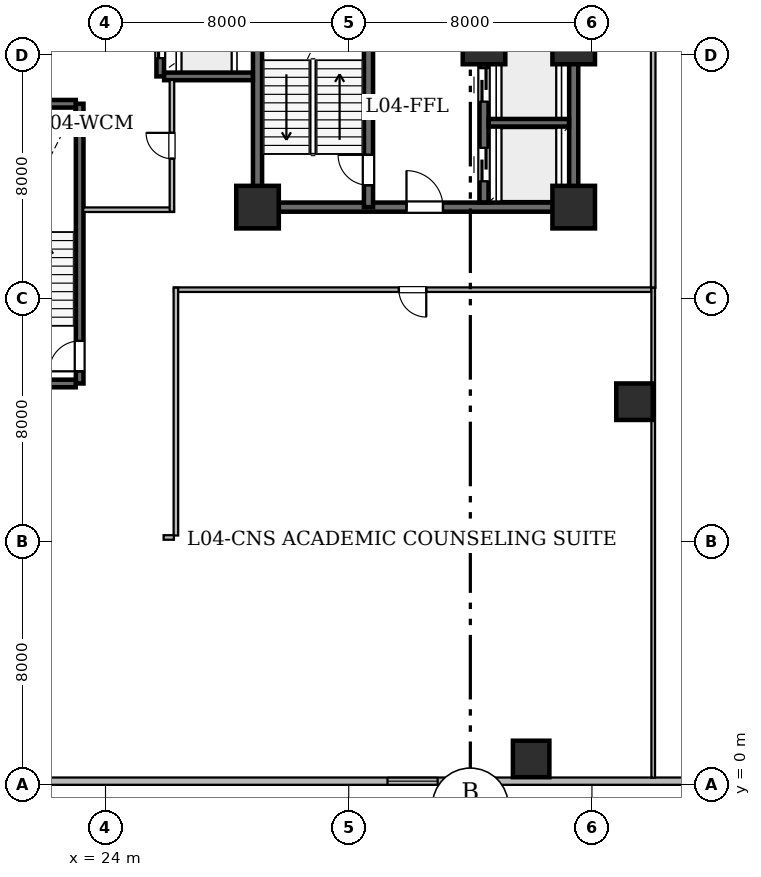
"""IFC4 building model, lengths in metres.
Left out: names, types, materials, properties, quantities, classifications, styles, units other than length and angle.
Written with IfcOpenShell. Run it as: python <this file> out.ifc"""

import sys

from ifc_helpers import new_model, si_unit, direction, frame, frame_2d, origin, origin_2d, place, context, subcontext, project, spatial, rectangle, hollow_rectangle, extrude, element, fill, save


model = new_model("IFC4")
c1 = context("Model", 3, precision=1e-05, world=origin(), true_north=direction((0.0, 1.0)))
c2 = subcontext(c1, "Body", "Model", "MODEL_VIEW")
j1 = project(units=[si_unit("LENGTHUNIT", "METRE"), si_unit("PLANEANGLEUNIT", "RADIAN")], contexts=[c1])
p1 = place(None, origin())
s1 = spatial("IfcSite", under=j1, at=p1, CompositionType="ELEMENT")
p2 = place(p1, origin())
s2 = spatial("IfcBuilding", under=s1, at=p2, CompositionType="ELEMENT")
p3 = place(p2, frame((0.0, 0.0, 20.4)))
s3 = spatial("IfcBuildingStorey", under=s2, at=p3, CompositionType="ELEMENT", Elevation=20.4)
for number, where, z_axis, x_axis in (
    (1, (29.0, 19.0, 0.0), (0.0, 0.0, 1.0), (1.0, 0.0, 0.0)),
    (2, (39.4, 19.0, 0.0), (0.0, 0.0, 1.0), (1.0, 0.0, 0.0)),
    (3, (36.45, 24.4, 0.0), (0.0, 0.0, 1.0), (1.0, 0.0, 0.0)),
    (4, (39.4, 24.4, 0.0), (0.0, 0.0, 1.0), (1.0, 0.0, 0.0)),
):
    element("IfcColumn", number, at=place(p3, frame(where, z_axis=z_axis, x_axis=x_axis)), inside=s3, PredefinedType="COLUMN", context=c2, shape_type="SweptSolid", body=[
        extrude(hollow_rectangle(XDim=1.4, YDim=1.4, WallThickness=0.07, at=origin_2d()), origin(), (0.0, 0.0, 1.0), 4.2),
    ])
for number, where, z_axis, x_axis in (
    (5, (38.0, 0.85, 0.0), (0.0, 0.0, 1.0), (1.0, 0.0, 0.0)),
    (6, (41.4, 12.6, 0.0), (0.0, 0.0, 1.0), (1.0, 0.0, 0.0)),
):
    element("IfcColumn", number, at=place(p3, frame(where, z_axis=z_axis, x_axis=x_axis)), inside=s3, PredefinedType="COLUMN", context=c2, shape_type="SweptSolid", body=[
        extrude(hollow_rectangle(XDim=1.2, YDim=1.2, WallThickness=0.06, at=origin_2d()), origin(), (0.0, 0.0, 1.0), 4.2),
    ])
p4 = place(p3, frame((50.275, 0.12, 0.0), z_axis=(0.0, 0.0, 1.0), x_axis=(-1.0, 0.0, 0.0)))
e7 = element("IfcWall", 7, at=p4, inside=s3, PredefinedType="STANDARD", context=c2, shape_type="SweptSolid", body=[
    extrude(rectangle(XDim=44.55, YDim=0.24, at=frame_2d((22.275, 0.0))), origin(), (0.0, 0.0, 1.0), 3.92),
])
p5 = place(p4, frame((15.35, 0.0, 0.85)))
e8 = element("IfcOpeningElement", 8, at=p5, cuts=e7, PredefinedType="OPENING", context=c2, shape_type="SweptSolid", body=[
    extrude(rectangle(XDim=1.65, YDim=1.55, at=frame_2d((0.825, 0.775))), frame((0.0, 0.13, 0.0), z_axis=(0.0, -1.0, 0.0), x_axis=(1.0, 0.0, 0.0)), (0.0, 0.0, 1.0), 0.26),
])
p6 = place(p3, frame((29.0, 19.0, 0.0), z_axis=(0.0, 0.0, 1.0), x_axis=(0.0, 1.0, 0.0)))
e9 = element("IfcWall", 9, at=p6, inside=s3, PredefinedType="SHEAR", context=c2, shape_type="SweptSolid", body=[
    extrude(rectangle(XDim=9.0, YDim=0.3, at=frame_2d((4.5, 0.0))), origin(), (0.0, 0.0, 1.0), 3.92),
])
p7 = place(p3, frame((29.0, 19.0, 0.0), z_axis=(0.0, 0.0, 1.0), x_axis=(1.0, 0.0, 0.0)))
e10 = element("IfcWall", 10, at=p7, inside=s3, PredefinedType="SHEAR", context=c2, shape_type="SweptSolid", body=[
    extrude(rectangle(XDim=10.4, YDim=0.3, at=frame_2d((5.2, 0.0))), origin(), (0.0, 0.0, 1.0), 3.92),
])
p8 = place(p7, frame((4.9, 0.0, 0.0)))
e11 = element("IfcOpeningElement", 11, at=p8, cuts=e10, PredefinedType="OPENING", context=c2, shape_type="SweptSolid", body=[
    extrude(rectangle(XDim=1.2, YDim=2.15, at=frame_2d((0.6, 1.075))), frame((0.0, 0.16, 0.0), z_axis=(0.0, -1.0, 0.0), x_axis=(1.0, 0.0, 0.0)), (0.0, 0.0, 1.0), 0.32),
])
p9 = place(p3, frame((39.4, 19.0, 0.0), z_axis=(0.0, 0.0, 1.0), x_axis=(0.0, 1.0, 0.0)))
e12 = element("IfcWall", 12, at=p9, inside=s3, PredefinedType="SHEAR", context=c2, shape_type="SweptSolid", body=[
    extrude(rectangle(XDim=5.4, YDim=0.3, at=frame_2d((2.7, 0.0))), origin(), (0.0, 0.0, 1.0), 3.92),
])
p10 = place(p3, frame((32.65, 19.0, 0.0), z_axis=(0.0, 0.0, 1.0), x_axis=(0.0, 1.0, 0.0)))
e13 = element("IfcWall", 13, at=p10, inside=s3, PredefinedType="SHEAR", context=c2, shape_type="SweptSolid", body=[
    extrude(rectangle(XDim=9.0, YDim=0.3, at=frame_2d((4.5, 0.0))), origin(), (0.0, 0.0, 1.0), 3.92),
])
p11 = place(p10, frame((0.72, 0.0, 0.0)))
e14 = element("IfcOpeningElement", 14, at=p11, cuts=e13, PredefinedType="OPENING", context=c2, shape_type="SweptSolid", body=[
    extrude(rectangle(XDim=1.0, YDim=2.15, at=frame_2d((0.5, 1.075))), frame((0.0, 0.16, 0.0), z_axis=(0.0, -1.0, 0.0), x_axis=(1.0, 0.0, 0.0)), (0.0, 0.0, 1.0), 0.32),
])
p12 = place(p3, frame((36.45, 19.154, 0.0), z_axis=(0.0, 0.0, 1.0), x_axis=(0.0, 1.0, 0.0)))
e15 = element("IfcWall", 15, at=p12, inside=s3, PredefinedType="SHEAR", context=c2, shape_type="SweptSolid", body=[
    extrude(rectangle(XDim=4.546, YDim=0.3, at=frame_2d((2.273, 0.0))), origin(), (0.0, 0.0, 1.0), 3.92),
])
p13 = place(p12, frame((0.696, 0.0, 0.0)))
e16 = element("IfcOpeningElement", 16, at=p13, cuts=e15, PredefinedType="OPENING", context=c2, shape_type="SweptSolid", body=[
    extrude(rectangle(XDim=1.1, YDim=2.15, at=frame_2d((0.55, 1.075))), frame((0.0, 0.16, 0.0), z_axis=(0.0, -1.0, 0.0), x_axis=(1.0, 0.0, 0.0)), (0.0, 0.0, 1.0), 0.32),
])
p14 = place(p12, frame((3.316, 0.0, 0.0)))
e17 = element("IfcOpeningElement", 17, at=p14, cuts=e15, PredefinedType="OPENING", context=c2, shape_type="SweptSolid", body=[
    extrude(rectangle(XDim=1.1, YDim=2.15, at=frame_2d((0.55, 1.075))), frame((0.0, 0.16, 0.0), z_axis=(0.0, -1.0, 0.0), x_axis=(1.0, 0.0, 0.0)), (0.0, 0.0, 1.0), 0.32),
])
p15 = place(p3, frame((36.604, 21.775, 0.0), z_axis=(0.0, 0.0, 1.0), x_axis=(1.0, 0.0, 0.0)))
e18 = element("IfcWall", 18, at=p15, inside=s3, PredefinedType="SHEAR", context=c2, shape_type="SweptSolid", body=[
    extrude(rectangle(XDim=2.642, YDim=0.25, at=frame_2d((1.321, 0.0))), origin(), (0.0, 0.0, 1.0), 3.92),
])
p16 = place(p3, frame((23.15, 13.2, 0.0), z_axis=(0.0, 0.0, 1.0), x_axis=(0.0, 1.0, 0.0)))
e19 = element("IfcWall", 19, at=p16, inside=s3, PredefinedType="SHEAR", context=c2, shape_type="SweptSolid", body=[
    extrude(rectangle(XDim=9.2, YDim=0.25, at=frame_2d((4.6, 0.0))), origin(), (0.0, 0.0, 1.0), 3.92),
])
p17 = place(p16, frame((0.4, 0.0, 0.0)))
e20 = element("IfcOpeningElement", 20, at=p17, cuts=e19, PredefinedType="OPENING", context=c2, shape_type="SweptSolid", body=[
    extrude(rectangle(XDim=1.0, YDim=2.15, at=frame_2d((0.5, 1.075))), frame((0.0, 0.135, 0.0), z_axis=(0.0, -1.0, 0.0), x_axis=(1.0, 0.0, 0.0)), (0.0, 0.0, 1.0), 0.27),
])
for number, where, z_axis, x_axis in (
    (21, (19.329, 13.2, 0.0), (0.0, 0.0, 1.0), (1.0, 0.0, 0.0)),
    (22, (19.329, 22.4, 0.0), (0.0, 0.0, 1.0), (1.0, 0.0, 0.0)),
):
    element("IfcWall", number, at=place(p3, frame(where, z_axis=z_axis, x_axis=x_axis)), inside=s3, PredefinedType="SHEAR", context=c2, shape_type="SweptSolid", body=[
        extrude(rectangle(XDim=3.692, YDim=0.25, at=frame_2d((1.846, 0.0))), origin(), (0.0, 0.0, 1.0), 3.92),
    ])
p18 = place(p3, frame((25.8, 23.3, 0.0), z_axis=(0.0, 0.0, 1.0), x_axis=(0.0, 1.0, 0.0)))
e23 = element("IfcWall", 23, at=p18, inside=s3, PredefinedType="SHEAR", context=c2, shape_type="SweptSolid", body=[
    extrude(rectangle(XDim=4.55, YDim=0.25, at=frame_2d((2.275, 0.0))), origin(), (0.0, 0.0, 1.0), 3.92),
])
p19 = place(p18, frame((0.6, 0.0, 0.0)))
e24 = element("IfcOpeningElement", 24, at=p19, cuts=e23, PredefinedType="OPENING", context=c2, shape_type="SweptSolid", body=[
    extrude(rectangle(XDim=1.1, YDim=2.15, at=frame_2d((0.55, 1.075))), frame((0.0, 0.135, 0.0), z_axis=(0.0, -1.0, 0.0), x_axis=(1.0, 0.0, 0.0)), (0.0, 0.0, 1.0), 0.27),
])
p20 = place(p18, frame((2.85, 0.0, 0.0)))
e25 = element("IfcOpeningElement", 25, at=p20, cuts=e23, PredefinedType="OPENING", context=c2, shape_type="SweptSolid", body=[
    extrude(rectangle(XDim=1.1, YDim=2.15, at=frame_2d((0.55, 1.075))), frame((0.0, 0.135, 0.0), z_axis=(0.0, -1.0, 0.0), x_axis=(1.0, 0.0, 0.0)), (0.0, 0.0, 1.0), 0.27),
])
p21 = place(p3, frame((25.929, 23.3, 0.0), z_axis=(0.0, 0.0, 1.0), x_axis=(1.0, 0.0, 0.0)))
e26 = element("IfcWall", 26, at=p21, inside=s3, PredefinedType="SHEAR", context=c2, shape_type="SweptSolid", body=[
    extrude(rectangle(XDim=2.917, YDim=0.25, at=frame_2d((1.458, 0.0))), origin(), (0.0, 0.0, 1.0), 3.92),
])
p22 = place(p3, frame((23.267, 18.915, 0.0), z_axis=(0.0, 0.0, 1.0), x_axis=(1.0, 0.0, 0.0)))
e27 = element("IfcWall", 27, at=p22, inside=s3, PredefinedType="STANDARD", context=c2, shape_type="SweptSolid", body=[
    extrude(rectangle(XDim=2.983, YDim=0.15, at=frame_2d((1.491, 0.0))), origin(), (0.0, 0.0, 1.0), 3.92),
])
p23 = place(p3, frame((26.185, 18.852, 0.0), z_axis=(0.0, 0.0, 1.0), x_axis=(0.0, 1.0, 0.0)))
e28 = element("IfcWall", 28, at=p23, inside=s3, PredefinedType="STANDARD", context=c2, shape_type="SweptSolid", body=[
    extrude(rectangle(XDim=4.331, YDim=0.15, at=frame_2d((2.166, 0.0))), origin(), (0.0, 0.0, 1.0), 3.92),
])
p24 = place(p23, frame((1.741, 0.0, 0.0)))
e29 = element("IfcOpeningElement", 29, at=p24, cuts=e28, PredefinedType="OPENING", context=c2, shape_type="SweptSolid", body=[
    extrude(rectangle(XDim=0.85, YDim=2.1, at=frame_2d((0.425, 1.05))), frame((0.0, 0.085, 0.0), z_axis=(0.0, -1.0, 0.0), x_axis=(1.0, 0.0, 0.0)), (0.0, 0.0, 1.0), 0.17),
])
p25 = place(p3, frame((42.015, 36.314, 0.0), z_axis=(0.0, 0.0, 1.0), x_axis=(0.0, -1.0, 0.0)))
e30 = element("IfcWall", 30, at=p25, inside=s3, PredefinedType="STANDARD", context=c2, shape_type="SweptSolid", body=[
    extrude(rectangle(XDim=19.964, YDim=0.15, at=frame_2d((9.982, 0.0))), origin(), (0.0, 0.0, 1.0), 3.055),
])
p26 = place(p25, frame((9.428, 0.0, 0.0)))
e31 = element("IfcOpeningElement", 31, at=p26, cuts=e30, PredefinedType="OPENING", context=c2, shape_type="SweptSolid", body=[
    extrude(rectangle(XDim=1.15, YDim=2.2, at=frame_2d((0.575, 1.1))), frame((0.0, 0.085, 0.0), z_axis=(0.0, -1.0, 0.0), x_axis=(1.0, 0.0, 0.0)), (0.0, 0.0, 1.0), 0.17),
])
p27 = place(p3, frame((41.95, 16.285, 0.0), z_axis=(0.0, 0.0, 1.0), x_axis=(-1.0, 0.0, 0.0)))
e32 = element("IfcWall", 32, at=p27, inside=s3, PredefinedType="STANDARD", context=c2, shape_type="SweptSolid", body=[
    extrude(rectangle(XDim=15.7, YDim=0.15, at=frame_2d((7.85, 0.0))), origin(), (0.0, 0.0, 1.0), 3.055),
])
p28 = place(p27, frame((7.4, 0.0, 0.0)))
e33 = element("IfcOpeningElement", 33, at=p28, cuts=e32, PredefinedType="OPENING", context=c2, shape_type="SweptSolid", body=[
    extrude(rectangle(XDim=0.9, YDim=2.1, at=frame_2d((0.45, 1.05))), frame((0.0, 0.085, 0.0), z_axis=(0.0, -1.0, 0.0), x_axis=(1.0, 0.0, 0.0)), (0.0, 0.0, 1.0), 0.17),
])
p29 = place(p3, frame((26.315, 16.35, 0.0), z_axis=(0.0, 0.0, 1.0), x_axis=(0.0, -1.0, 0.0)))
e34 = element("IfcWall", 34, at=p29, inside=s3, PredefinedType="STANDARD", context=c2, shape_type="SweptSolid", body=[
    extrude(rectangle(XDim=8.15, YDim=0.15, at=frame_2d((4.075, 0.0))), origin(), (0.0, 0.0, 1.0), 3.055),
])
p30 = place(p3, frame((26.25, 8.135, 0.0), z_axis=(0.0, 0.0, 1.0), x_axis=(-1.0, 0.0, 0.0)))
e35 = element("IfcWall", 35, at=p30, inside=s3, PredefinedType="STANDARD", context=c2, shape_type="SweptSolid", body=[
    extrude(rectangle(XDim=0.339, YDim=0.15, at=frame_2d((0.169, 0.0))), origin(), (0.0, 0.0, 1.0), 3.92),
])
p31 = place(p3, frame((42.015, 0.232, 0.0), z_axis=(0.0, 0.0, 1.0), x_axis=(0.0, 1.0, 0.0)))
e36 = element("IfcWall", 36, at=p31, inside=s3, PredefinedType="PARTITIONING", context=c2, shape_type="SweptSolid", body=[
    extrude(rectangle(XDim=16.118, YDim=0.12, at=frame_2d((8.059, 0.0))), origin(), (0.0, 0.0, 1.0), 3.055),
])
p32 = place(p5, origin())
e37 = element("IfcWindow", 37, at=p32, inside=s3, PartitioningType="SINGLE_PANEL", PredefinedType="WINDOW", context=c2, shape_type="SweptSolid", body=[
    extrude(rectangle(XDim=1.65, YDim=1.55, at=frame_2d((0.825, 0.775))), frame((0.0, 0.03, 0.0), z_axis=(0.0, -1.0, 0.0), x_axis=(1.0, 0.0, 0.0)), (0.0, 0.0, 1.0), 0.06),
])
fill(e8, e37)
p33 = place(p11, origin())
e38 = element("IfcDoor", 38, at=p33, inside=s3, OperationType="SINGLE_SWING_RIGHT", PredefinedType="DOOR", context=c2, shape_type="SweptSolid", body=[
    extrude(rectangle(XDim=1.0, YDim=2.15, at=frame_2d((0.5, 1.075))), frame((0.0, 0.025, 0.0), z_axis=(0.0, -1.0, 0.0), x_axis=(1.0, 0.0, 0.0)), (0.0, 0.0, 1.0), 0.05),
])
fill(e14, e38)
p34 = place(p8, origin())
e39 = element("IfcDoor", 39, at=p34, inside=s3, OperationType="SINGLE_SWING_LEFT", PredefinedType="DOOR", context=c2, shape_type="SweptSolid", body=[
    extrude(rectangle(XDim=1.2, YDim=2.15, at=frame_2d((0.6, 1.075))), frame((0.0, 0.025, 0.0), z_axis=(0.0, -1.0, 0.0), x_axis=(1.0, 0.0, 0.0)), (0.0, 0.0, 1.0), 0.05),
])
fill(e11, e39)
p35 = place(p13, origin())
e40 = element("IfcDoor", 40, at=p35, inside=s3, OperationType="SLIDING_TO_LEFT", PredefinedType="DOOR", context=c2, shape_type="SweptSolid", body=[
    extrude(rectangle(XDim=1.1, YDim=2.15, at=frame_2d((0.55, 1.075))), frame((0.0, 0.025, 0.0), z_axis=(0.0, -1.0, 0.0), x_axis=(1.0, 0.0, 0.0)), (0.0, 0.0, 1.0), 0.05),
])
fill(e16, e40)
p36 = place(p14, origin())
e41 = element("IfcDoor", 41, at=p36, inside=s3, OperationType="SLIDING_TO_LEFT", PredefinedType="DOOR", context=c2, shape_type="SweptSolid", body=[
    extrude(rectangle(XDim=1.1, YDim=2.15, at=frame_2d((0.55, 1.075))), frame((0.0, 0.025, 0.0), z_axis=(0.0, -1.0, 0.0), x_axis=(1.0, 0.0, 0.0)), (0.0, 0.0, 1.0), 0.05),
])
fill(e17, e41)
p37 = place(p17, origin())
e42 = element("IfcDoor", 42, at=p37, inside=s3, OperationType="SINGLE_SWING_LEFT", PredefinedType="DOOR", context=c2, shape_type="SweptSolid", body=[
    extrude(rectangle(XDim=1.0, YDim=2.15, at=frame_2d((0.5, 1.075))), frame((0.0, 0.025, 0.0), z_axis=(0.0, -1.0, 0.0), x_axis=(1.0, 0.0, 0.0)), (0.0, 0.0, 1.0), 0.05),
])
fill(e20, e42)
p38 = place(p19, origin())
e43 = element("IfcDoor", 43, at=p38, inside=s3, OperationType="SLIDING_TO_LEFT", PredefinedType="DOOR", context=c2, shape_type="SweptSolid", body=[
    extrude(rectangle(XDim=1.1, YDim=2.15, at=frame_2d((0.55, 1.075))), frame((0.0, 0.025, 0.0), z_axis=(0.0, -1.0, 0.0), x_axis=(1.0, 0.0, 0.0)), (0.0, 0.0, 1.0), 0.05),
])
fill(e24, e43)
p39 = place(p24, origin())
e44 = element("IfcDoor", 44, at=p39, inside=s3, OperationType="SINGLE_SWING_RIGHT", PredefinedType="DOOR", context=c2, shape_type="SweptSolid", body=[
    extrude(rectangle(XDim=0.85, YDim=2.1, at=frame_2d((0.425, 1.05))), frame((0.0, 0.025, 0.0), z_axis=(0.0, -1.0, 0.0), x_axis=(1.0, 0.0, 0.0)), (0.0, 0.0, 1.0), 0.05),
])
fill(e29, e44)
p40 = place(p28, origin())
e45 = element("IfcDoor", 45, at=p40, inside=s3, OperationType="SINGLE_SWING_LEFT", PredefinedType="DOOR", context=c2, shape_type="SweptSolid", body=[
    extrude(rectangle(XDim=0.9, YDim=2.1, at=frame_2d((0.45, 1.05))), frame((0.0, 0.025, 0.0), z_axis=(0.0, -1.0, 0.0), x_axis=(1.0, 0.0, 0.0)), (0.0, 0.0, 1.0), 0.05),
])
fill(e33, e45)
save(model, sys.argv[1])
